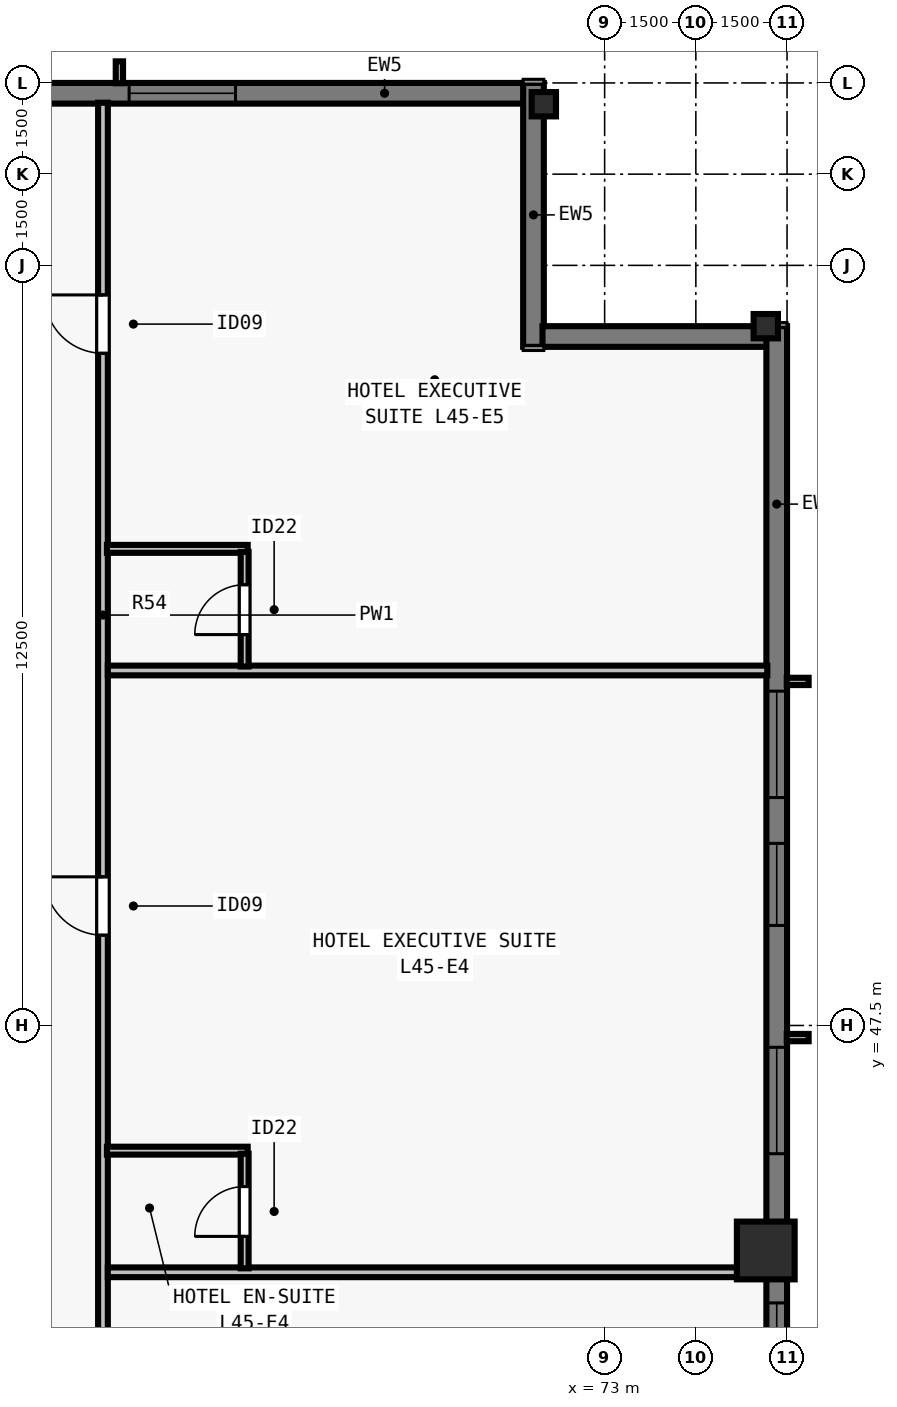
"""IFC4 building model, lengths in metres.
Left out: names, types, materials, properties, quantities, classifications, styles, units other than length and angle.
Written with IfcOpenShell. Run it as: python <this file> out.ifc"""

import sys

from ifc_helpers import new_model, si_unit, direction, frame, frame_2d, origin, origin_2d, place, context, subcontext, project, spatial, rectangle, i_section, extrude, element, fill, save


model = new_model("IFC4")
c1 = context("Model", 3, precision=1e-05, world=origin(), true_north=direction((0.0, 1.0)))
c2 = subcontext(c1, "Body", "Model", "MODEL_VIEW")
j1 = project(units=[si_unit("LENGTHUNIT", "METRE"), si_unit("PLANEANGLEUNIT", "RADIAN")], contexts=[c1])
p1 = place(None, origin())
s1 = spatial("IfcSite", under=j1, at=p1, CompositionType="ELEMENT")
p2 = place(p1, origin())
s2 = spatial("IfcBuilding", under=s1, at=p2, CompositionType="ELEMENT")
p3 = place(p2, frame((0.0, 0.0, 165.5)))
s3 = spatial("IfcBuildingStorey", under=s2, at=p3, CompositionType="ELEMENT", Elevation=165.5)
p4 = place(p3, frame((75.65, 43.8, 0.0), z_axis=(0.0, 0.0, 1.0), x_axis=(0.0, 1.0, 0.0)))
e1 = element("IfcColumn", 1, at=p4, inside=s3, PredefinedType="COLUMN", context=c2, shape_type="SweptSolid", body=[
    extrude(rectangle(XDim=0.95, YDim=0.95, at=origin_2d()), origin(), (0.0, 0.0, 1.0), 3.5),
])
for number, where, z_axis, x_axis in (
    (2, (75.65, 59.0, 0.0), (0.0, 0.0, 1.0), (0.0, 1.0, 0.0)),
    (3, (72.0, 62.65, 0.0), (0.0, 0.0, 1.0), (1.0, 0.0, 0.0)),
):
    element("IfcColumn", number, at=place(p3, frame(where, z_axis=z_axis, x_axis=x_axis)), inside=s3, PredefinedType="COLUMN", context=c2, shape_type="SweptSolid", body=[
        extrude(i_section(OverallWidth=0.4, OverallDepth=0.4, WebThickness=0.022, FlangeThickness=0.036, at=origin_2d()), origin(), (0.0, 0.0, 1.0), 3.5),
    ])
p5 = place(p3, frame((32.0, 62.83, 0.0), z_axis=(0.0, 0.0, 1.0), x_axis=(1.0, 0.0, 0.0)))
e4 = element("IfcWall", 4, at=p5, inside=s3, PredefinedType="SOLIDWALL", context=c2, shape_type="SweptSolid", body=[
    extrude(rectangle(XDim=39.682, YDim=0.34, at=frame_2d((19.841, 0.0))), origin(), (0.0, 0.0, 1.0), 3.28),
])
p6 = place(p5, frame((3.902, 0.0, 0.8)))
e5 = element("IfcOpeningElement", 5, at=p6, cuts=e4, PredefinedType="OPENING", context=c2, shape_type="SweptSolid", body=[
    extrude(rectangle(XDim=1.75, YDim=1.66, at=frame_2d((0.875, 0.83))), frame((0.0, 0.18, 0.0), z_axis=(0.0, -1.0, 0.0), x_axis=(1.0, 0.0, 0.0)), (0.0, 0.0, 1.0), 0.36),
])
p7 = place(p5, frame((8.955, 0.0, 0.8)))
e6 = element("IfcOpeningElement", 6, at=p7, cuts=e4, PredefinedType="OPENING", context=c2, shape_type="SweptSolid", body=[
    extrude(rectangle(XDim=1.35, YDim=1.66, at=frame_2d((0.675, 0.83))), frame((0.0, 0.18, 0.0), z_axis=(0.0, -1.0, 0.0), x_axis=(1.0, 0.0, 0.0)), (0.0, 0.0, 1.0), 0.36),
])
p8 = place(p5, frame((11.859, 0.0, 0.8)))
e7 = element("IfcOpeningElement", 7, at=p8, cuts=e4, PredefinedType="OPENING", context=c2, shape_type="SweptSolid", body=[
    extrude(rectangle(XDim=1.75, YDim=1.66, at=frame_2d((0.875, 0.83))), frame((0.0, 0.18, 0.0), z_axis=(0.0, -1.0, 0.0), x_axis=(1.0, 0.0, 0.0)), (0.0, 0.0, 1.0), 0.36),
])
p9 = place(p5, frame((16.062, 0.0, 0.8)))
e8 = element("IfcOpeningElement", 8, at=p9, cuts=e4, PredefinedType="OPENING", context=c2, shape_type="SweptSolid", body=[
    extrude(rectangle(XDim=1.35, YDim=1.66, at=frame_2d((0.675, 0.83))), frame((0.0, 0.18, 0.0), z_axis=(0.0, -1.0, 0.0), x_axis=(1.0, 0.0, 0.0)), (0.0, 0.0, 1.0), 0.36),
])
p10 = place(p5, frame((18.966, 0.0, 0.8)))
e9 = element("IfcOpeningElement", 9, at=p10, cuts=e4, PredefinedType="OPENING", context=c2, shape_type="SweptSolid", body=[
    extrude(rectangle(XDim=1.75, YDim=1.66, at=frame_2d((0.875, 0.83))), frame((0.0, 0.18, 0.0), z_axis=(0.0, -1.0, 0.0), x_axis=(1.0, 0.0, 0.0)), (0.0, 0.0, 1.0), 0.36),
])
p11 = place(p5, frame((22.719, 0.0, 0.8)))
e10 = element("IfcOpeningElement", 10, at=p11, cuts=e4, PredefinedType="OPENING", context=c2, shape_type="SweptSolid", body=[
    extrude(rectangle(XDim=1.35, YDim=1.66, at=frame_2d((0.675, 0.83))), frame((0.0, 0.18, 0.0), z_axis=(0.0, -1.0, 0.0), x_axis=(1.0, 0.0, 0.0)), (0.0, 0.0, 1.0), 0.36),
])
p12 = place(p5, frame((26.073, 0.0, 0.8)))
e11 = element("IfcOpeningElement", 11, at=p12, cuts=e4, PredefinedType="OPENING", context=c2, shape_type="SweptSolid", body=[
    extrude(rectangle(XDim=1.75, YDim=1.66, at=frame_2d((0.875, 0.83))), frame((0.0, 0.18, 0.0), z_axis=(0.0, -1.0, 0.0), x_axis=(1.0, 0.0, 0.0)), (0.0, 0.0, 1.0), 0.36),
])
p13 = place(p5, frame((28.977, 0.0, 0.8)))
e12 = element("IfcOpeningElement", 12, at=p13, cuts=e4, PredefinedType="OPENING", context=c2, shape_type="SweptSolid", body=[
    extrude(rectangle(XDim=1.35, YDim=1.66, at=frame_2d((0.675, 0.83))), frame((0.0, 0.18, 0.0), z_axis=(0.0, -1.0, 0.0), x_axis=(1.0, 0.0, 0.0)), (0.0, 0.0, 1.0), 0.36),
])
p14 = place(p5, frame((33.18, 0.0, 0.8)))
e13 = element("IfcOpeningElement", 13, at=p14, cuts=e4, PredefinedType="OPENING", context=c2, shape_type="SweptSolid", body=[
    extrude(rectangle(XDim=1.75, YDim=1.66, at=frame_2d((0.875, 0.83))), frame((0.0, 0.18, 0.0), z_axis=(0.0, -1.0, 0.0), x_axis=(1.0, 0.0, 0.0)), (0.0, 0.0, 1.0), 0.36),
])
p15 = place(p3, frame((71.83, 63.0, 0.0), z_axis=(0.0, 0.0, 1.0), x_axis=(0.0, -1.0, 0.0)))
e14 = element("IfcWall", 14, at=p15, inside=s3, PredefinedType="SOLIDWALL", context=c2, shape_type="SweptSolid", body=[
    extrude(rectangle(XDim=4.34, YDim=0.34, at=frame_2d((2.17, 0.0))), origin(), (0.0, 0.0, 1.0), 3.28),
])
p16 = place(p3, frame((71.978, 58.83, 0.0), z_axis=(0.0, 0.0, 1.0), x_axis=(1.0, 0.0, 0.0)))
e15 = element("IfcWall", 15, at=p16, inside=s3, PredefinedType="SOLIDWALL", context=c2, shape_type="SweptSolid", body=[
    extrude(rectangle(XDim=3.704, YDim=0.34, at=frame_2d((1.852, 0.0))), origin(), (0.0, 0.0, 1.0), 3.28),
])
p17 = place(p3, frame((75.83, 59.0, 0.0), z_axis=(0.0, 0.0, 1.0), x_axis=(0.0, -1.0, 0.0)))
e16 = element("IfcWall", 16, at=p17, inside=s3, PredefinedType="SOLIDWALL", context=c2, shape_type="SweptSolid", body=[
    extrude(rectangle(XDim=39.682, YDim=0.34, at=frame_2d((19.841, 0.0))), origin(), (0.0, 0.0, 1.0), 3.28),
])
p18 = place(p17, frame((6.002, 0.0, 0.8)))
e17 = element("IfcOpeningElement", 17, at=p18, cuts=e16, PredefinedType="OPENING", context=c2, shape_type="SweptSolid", body=[
    extrude(rectangle(XDim=1.75, YDim=1.66, at=frame_2d((0.875, 0.83))), frame((0.0, 0.18, 0.0), z_axis=(0.0, -1.0, 0.0), x_axis=(1.0, 0.0, 0.0)), (0.0, 0.0, 1.0), 0.36),
])
p19 = place(p17, frame((8.505, 0.0, 0.8)))
e18 = element("IfcOpeningElement", 18, at=p19, cuts=e16, PredefinedType="OPENING", context=c2, shape_type="SweptSolid", body=[
    extrude(rectangle(XDim=1.35, YDim=1.66, at=frame_2d((0.675, 0.83))), frame((0.0, 0.18, 0.0), z_axis=(0.0, -1.0, 0.0), x_axis=(1.0, 0.0, 0.0)), (0.0, 0.0, 1.0), 0.36),
])
p20 = place(p17, frame((11.859, 0.0, 0.8)))
e19 = element("IfcOpeningElement", 19, at=p20, cuts=e16, PredefinedType="OPENING", context=c2, shape_type="SweptSolid", body=[
    extrude(rectangle(XDim=1.75, YDim=1.66, at=frame_2d((0.875, 0.83))), frame((0.0, 0.18, 0.0), z_axis=(0.0, -1.0, 0.0), x_axis=(1.0, 0.0, 0.0)), (0.0, 0.0, 1.0), 0.36),
])
p21 = place(p17, frame((16.062, 0.0, 0.8)))
e20 = element("IfcOpeningElement", 20, at=p21, cuts=e16, PredefinedType="OPENING", context=c2, shape_type="SweptSolid", body=[
    extrude(rectangle(XDim=1.35, YDim=1.66, at=frame_2d((0.675, 0.83))), frame((0.0, 0.18, 0.0), z_axis=(0.0, -1.0, 0.0), x_axis=(1.0, 0.0, 0.0)), (0.0, 0.0, 1.0), 0.36),
])
p22 = place(p17, frame((18.966, 0.0, 0.8)))
e21 = element("IfcOpeningElement", 21, at=p22, cuts=e16, PredefinedType="OPENING", context=c2, shape_type="SweptSolid", body=[
    extrude(rectangle(XDim=1.75, YDim=1.66, at=frame_2d((0.875, 0.83))), frame((0.0, 0.18, 0.0), z_axis=(0.0, -1.0, 0.0), x_axis=(1.0, 0.0, 0.0)), (0.0, 0.0, 1.0), 0.36),
])
p23 = place(p17, frame((22.719, 0.0, 0.8)))
e22 = element("IfcOpeningElement", 22, at=p23, cuts=e16, PredefinedType="OPENING", context=c2, shape_type="SweptSolid", body=[
    extrude(rectangle(XDim=1.35, YDim=1.66, at=frame_2d((0.675, 0.83))), frame((0.0, 0.18, 0.0), z_axis=(0.0, -1.0, 0.0), x_axis=(1.0, 0.0, 0.0)), (0.0, 0.0, 1.0), 0.36),
])
p24 = place(p17, frame((26.073, 0.0, 0.8)))
e23 = element("IfcOpeningElement", 23, at=p24, cuts=e16, PredefinedType="OPENING", context=c2, shape_type="SweptSolid", body=[
    extrude(rectangle(XDim=1.75, YDim=1.66, at=frame_2d((0.875, 0.83))), frame((0.0, 0.18, 0.0), z_axis=(0.0, -1.0, 0.0), x_axis=(1.0, 0.0, 0.0)), (0.0, 0.0, 1.0), 0.36),
])
p25 = place(p17, frame((29.827, 0.0, 0.8)))
e24 = element("IfcOpeningElement", 24, at=p25, cuts=e16, PredefinedType="OPENING", context=c2, shape_type="SweptSolid", body=[
    extrude(rectangle(XDim=1.35, YDim=1.66, at=frame_2d((0.675, 0.83))), frame((0.0, 0.18, 0.0), z_axis=(0.0, -1.0, 0.0), x_axis=(1.0, 0.0, 0.0)), (0.0, 0.0, 1.0), 0.36),
])
p26 = place(p17, frame((32.33, 0.0, 0.8)))
e25 = element("IfcOpeningElement", 25, at=p26, cuts=e16, PredefinedType="OPENING", context=c2, shape_type="SweptSolid", body=[
    extrude(rectangle(XDim=1.75, YDim=1.66, at=frame_2d((0.875, 0.83))), frame((0.0, 0.18, 0.0), z_axis=(0.0, -1.0, 0.0), x_axis=(1.0, 0.0, 0.0)), (0.0, 0.0, 1.0), 0.36),
])
p27 = place(p17, frame((34.79, 0.0, 0.8)))
e26 = element("IfcOpeningElement", 26, at=p27, cuts=e16, PredefinedType="OPENING", context=c2, shape_type="SweptSolid", body=[
    extrude(rectangle(XDim=0.9, YDim=1.66, at=frame_2d((0.45, 0.83))), frame((0.0, 0.18, 0.0), z_axis=(0.0, -1.0, 0.0), x_axis=(1.0, 0.0, 0.0)), (0.0, 0.0, 1.0), 0.36),
])
p28 = place(p3, frame((64.75, 15.325, 0.0), z_axis=(0.0, 0.0, 1.0), x_axis=(0.0, 1.0, 0.0)))
e27 = element("IfcWall", 27, at=p28, inside=s3, PredefinedType="PARTITIONING", context=c2, shape_type="SweptSolid", body=[
    extrude(rectangle(XDim=47.35, YDim=0.16, at=frame_2d((23.675, 0.0))), origin(), (0.0, 0.0, 1.0), 2.555),
])
p29 = place(p28, frame((5.494, 0.0, 0.0)))
e28 = element("IfcOpeningElement", 28, at=p29, cuts=e27, PredefinedType="OPENING", context=c2, shape_type="SweptSolid", body=[
    extrude(rectangle(XDim=0.96, YDim=2.15, at=frame_2d((0.48, 1.075))), frame((0.0, 0.09, 0.0), z_axis=(0.0, -1.0, 0.0), x_axis=(1.0, 0.0, 0.0)), (0.0, 0.0, 1.0), 0.18),
])
p30 = place(p28, frame((14.796, 0.0, 0.0)))
e29 = element("IfcOpeningElement", 29, at=p30, cuts=e27, PredefinedType="OPENING", context=c2, shape_type="SweptSolid", body=[
    extrude(rectangle(XDim=0.96, YDim=2.15, at=frame_2d((0.48, 1.075))), frame((0.0, 0.09, 0.0), z_axis=(0.0, -1.0, 0.0), x_axis=(1.0, 0.0, 0.0)), (0.0, 0.0, 1.0), 0.18),
])
p31 = place(p28, frame((24.228, 0.0, 0.0)))
e30 = element("IfcOpeningElement", 30, at=p31, cuts=e27, PredefinedType="OPENING", context=c2, shape_type="SweptSolid", body=[
    extrude(rectangle(XDim=0.96, YDim=2.15, at=frame_2d((0.48, 1.075))), frame((0.0, 0.09, 0.0), z_axis=(0.0, -1.0, 0.0), x_axis=(1.0, 0.0, 0.0)), (0.0, 0.0, 1.0), 0.18),
])
p32 = place(p28, frame((33.66, 0.0, 0.0)))
e31 = element("IfcOpeningElement", 31, at=p32, cuts=e27, PredefinedType="OPENING", context=c2, shape_type="SweptSolid", body=[
    extrude(rectangle(XDim=0.96, YDim=2.15, at=frame_2d((0.48, 1.075))), frame((0.0, 0.09, 0.0), z_axis=(0.0, -1.0, 0.0), x_axis=(1.0, 0.0, 0.0)), (0.0, 0.0, 1.0), 0.18),
])
p33 = place(p28, frame((43.229, 0.0, 0.0)))
e32 = element("IfcOpeningElement", 32, at=p33, cuts=e27, PredefinedType="OPENING", context=c2, shape_type="SweptSolid", body=[
    extrude(rectangle(XDim=0.96, YDim=2.15, at=frame_2d((0.48, 1.075))), frame((0.0, 0.09, 0.0), z_axis=(0.0, -1.0, 0.0), x_axis=(1.0, 0.0, 0.0)), (0.0, 0.0, 1.0), 0.18),
])
p34 = place(p3, frame((64.83, 43.441, 0.0), z_axis=(0.0, 0.0, 1.0), x_axis=(1.0, 0.0, 0.0)))
e33 = element("IfcWall", 33, at=p34, inside=s3, PredefinedType="PARTITIONING", context=c2, shape_type="SweptSolid", body=[
    extrude(rectangle(XDim=10.845, YDim=0.16, at=frame_2d((5.422, 0.0))), origin(), (0.0, 0.0, 1.0), 3.28),
])
p35 = place(p3, frame((64.815, 45.441, 0.0), z_axis=(0.0, 0.0, 1.0), x_axis=(1.0, 0.0, 0.0)))
e34 = element("IfcWall", 34, at=p35, inside=s3, PredefinedType="PLUMBINGWALL", context=c2, shape_type="SweptSolid", body=[
    extrude(rectangle(XDim=2.315, YDim=0.13, at=frame_2d((1.157, 0.0))), origin(), (0.0, 0.0, 1.0), 3.28),
])
p36 = place(p3, frame((67.08, 43.506, 0.0), z_axis=(0.0, 0.0, 1.0), x_axis=(0.0, 1.0, 0.0)))
e35 = element("IfcWall", 35, at=p36, inside=s3, PredefinedType="PLUMBINGWALL", context=c2, shape_type="SweptSolid", body=[
    extrude(rectangle(XDim=1.885, YDim=0.13, at=frame_2d((0.942, 0.0))), origin(), (0.0, 0.0, 1.0), 3.28),
])
p37 = place(p36, frame((0.525, 0.0, 0.0)))
e36 = element("IfcOpeningElement", 36, at=p37, cuts=e35, PredefinedType="OPENING", context=c2, shape_type="SweptSolid", body=[
    extrude(rectangle(XDim=0.82, YDim=2.1, at=frame_2d((0.41, 1.05))), frame((0.0, 0.075, 0.0), z_axis=(0.0, -1.0, 0.0), x_axis=(1.0, 0.0, 0.0)), (0.0, 0.0, 1.0), 0.15),
])
p38 = place(p3, frame((64.83, 53.338, 0.0), z_axis=(0.0, 0.0, 1.0), x_axis=(1.0, 0.0, 0.0)))
e37 = element("IfcWall", 37, at=p38, inside=s3, PredefinedType="PARTITIONING", context=c2, shape_type="SweptSolid", body=[
    extrude(rectangle(XDim=10.845, YDim=0.16, at=frame_2d((5.422, 0.0))), origin(), (0.0, 0.0, 1.0), 2.896),
])
p39 = place(p3, frame((64.815, 55.338, 0.0), z_axis=(0.0, 0.0, 1.0), x_axis=(1.0, 0.0, 0.0)))
e38 = element("IfcWall", 38, at=p39, inside=s3, PredefinedType="PLUMBINGWALL", context=c2, shape_type="SweptSolid", body=[
    extrude(rectangle(XDim=2.315, YDim=0.13, at=frame_2d((1.157, 0.0))), origin(), (0.0, 0.0, 1.0), 3.28),
])
p40 = place(p3, frame((67.08, 53.403, 0.0), z_axis=(0.0, 0.0, 1.0), x_axis=(0.0, 1.0, 0.0)))
e39 = element("IfcWall", 39, at=p40, inside=s3, PredefinedType="PLUMBINGWALL", context=c2, shape_type="SweptSolid", body=[
    extrude(rectangle(XDim=1.885, YDim=0.13, at=frame_2d((0.942, 0.0))), origin(), (0.0, 0.0, 1.0), 3.28),
])
p41 = place(p40, frame((0.525, 0.0, 0.0)))
e40 = element("IfcOpeningElement", 40, at=p41, cuts=e39, PredefinedType="OPENING", context=c2, shape_type="SweptSolid", body=[
    extrude(rectangle(XDim=0.82, YDim=2.1, at=frame_2d((0.41, 1.05))), frame((0.0, 0.075, 0.0), z_axis=(0.0, -1.0, 0.0), x_axis=(1.0, 0.0, 0.0)), (0.0, 0.0, 1.0), 0.15),
])
p42 = place(p14, origin())
e41 = element("IfcWindow", 41, at=p42, inside=s3, PartitioningType="SINGLE_PANEL", PredefinedType="WINDOW", context=c2, shape_type="SweptSolid", body=[
    extrude(rectangle(XDim=1.75, YDim=1.66, at=frame_2d((0.875, 0.83))), frame((0.0, -0.05, 0.0), z_axis=(0.0, -1.0, 0.0), x_axis=(1.0, 0.0, 0.0)), (0.0, 0.0, 1.0), 0.06),
])
fill(e13, e41)
p43 = place(p18, origin())
e42 = element("IfcWindow", 42, at=p43, inside=s3, PartitioningType="SINGLE_PANEL", PredefinedType="WINDOW", context=c2, shape_type="SweptSolid", body=[
    extrude(rectangle(XDim=1.75, YDim=1.66, at=frame_2d((0.875, 0.83))), frame((0.0, -0.05, 0.0), z_axis=(0.0, -1.0, 0.0), x_axis=(1.0, 0.0, 0.0)), (0.0, 0.0, 1.0), 0.06),
])
fill(e17, e42)
p44 = place(p19, origin())
e43 = element("IfcWindow", 43, at=p44, inside=s3, PartitioningType="SINGLE_PANEL", PredefinedType="WINDOW", context=c2, shape_type="SweptSolid", body=[
    extrude(rectangle(XDim=1.35, YDim=1.66, at=frame_2d((0.675, 0.83))), frame((0.0, -0.05, 0.0), z_axis=(0.0, -1.0, 0.0), x_axis=(1.0, 0.0, 0.0)), (0.0, 0.0, 1.0), 0.06),
])
fill(e18, e43)
p45 = place(p20, origin())
e44 = element("IfcWindow", 44, at=p45, inside=s3, PartitioningType="SINGLE_PANEL", PredefinedType="WINDOW", context=c2, shape_type="SweptSolid", body=[
    extrude(rectangle(XDim=1.75, YDim=1.66, at=frame_2d((0.875, 0.83))), frame((0.0, -0.05, 0.0), z_axis=(0.0, -1.0, 0.0), x_axis=(1.0, 0.0, 0.0)), (0.0, 0.0, 1.0), 0.06),
])
fill(e19, e44)
p46 = place(p21, origin())
e45 = element("IfcWindow", 45, at=p46, inside=s3, PartitioningType="SINGLE_PANEL", PredefinedType="WINDOW", context=c2, shape_type="SweptSolid", body=[
    extrude(rectangle(XDim=1.35, YDim=1.66, at=frame_2d((0.675, 0.83))), frame((0.0, -0.05, 0.0), z_axis=(0.0, -1.0, 0.0), x_axis=(1.0, 0.0, 0.0)), (0.0, 0.0, 1.0), 0.06),
])
fill(e20, e45)
p47 = place(p37, origin())
e46 = element("IfcDoor", 46, at=p47, inside=s3, OperationType="SINGLE_SWING_LEFT", PredefinedType="DOOR", context=c2, shape_type="SweptSolid", body=[
    extrude(rectangle(XDim=0.82, YDim=2.1, at=frame_2d((0.41, 1.05))), frame((0.0, 0.025, 0.0), z_axis=(0.0, -1.0, 0.0), x_axis=(1.0, 0.0, 0.0)), (0.0, 0.0, 1.0), 0.05),
])
fill(e36, e46)
p48 = place(p32, origin())
e47 = element("IfcDoor", 47, at=p48, inside=s3, OperationType="SINGLE_SWING_RIGHT", PredefinedType="DOOR", context=c2, shape_type="SweptSolid", body=[
    extrude(rectangle(XDim=0.96, YDim=2.15, at=frame_2d((0.48, 1.075))), frame((0.0, 0.025, 0.0), z_axis=(0.0, -1.0, 0.0), x_axis=(1.0, 0.0, 0.0)), (0.0, 0.0, 1.0), 0.05),
])
fill(e31, e47)
p49 = place(p41, origin())
e48 = element("IfcDoor", 48, at=p49, inside=s3, OperationType="SINGLE_SWING_LEFT", PredefinedType="DOOR", context=c2, shape_type="SweptSolid", body=[
    extrude(rectangle(XDim=0.82, YDim=2.1, at=frame_2d((0.41, 1.05))), frame((0.0, 0.025, 0.0), z_axis=(0.0, -1.0, 0.0), x_axis=(1.0, 0.0, 0.0)), (0.0, 0.0, 1.0), 0.05),
])
fill(e40, e48)
p50 = place(p33, origin())
e49 = element("IfcDoor", 49, at=p50, inside=s3, OperationType="SINGLE_SWING_RIGHT", PredefinedType="DOOR", context=c2, shape_type="SweptSolid", body=[
    extrude(rectangle(XDim=0.96, YDim=2.15, at=frame_2d((0.48, 1.075))), frame((0.0, 0.025, 0.0), z_axis=(0.0, -1.0, 0.0), x_axis=(1.0, 0.0, 0.0)), (0.0, 0.0, 1.0), 0.05),
])
fill(e32, e49)
save(model, sys.argv[1])
